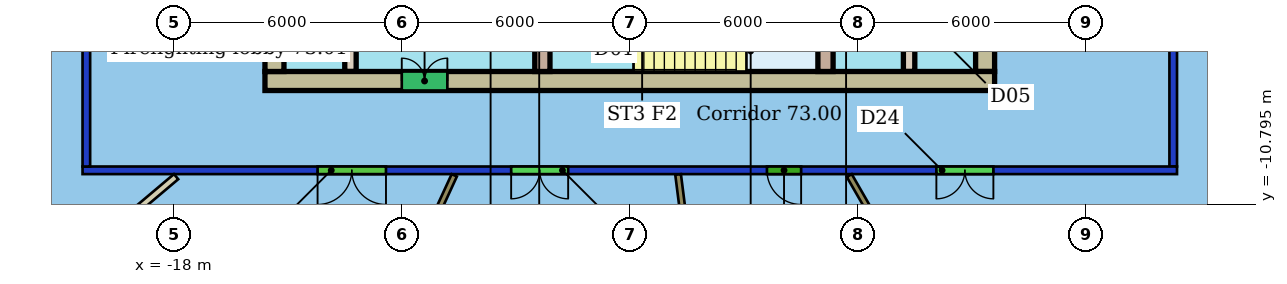
"""IFC4 building model, lengths in metres.
Left out: names, types, materials, properties, quantities, classifications, styles, units other than length and angle.
Written with IfcOpenShell. Run it as: python <this file> out.ifc"""

import sys

from ifc_helpers import new_model, si_unit, direction, frame, frame_2d, origin, place, context, subcontext, project, spatial, rectangle, extrude, element, fill, save


model = new_model("IFC4")
c1 = context("Model", 3, precision=1e-05, world=origin(), true_north=direction((0.0, 1.0)))
c2 = subcontext(c1, "Body", "Model", "MODEL_VIEW")
j1 = project(units=[si_unit("LENGTHUNIT", "METRE"), si_unit("PLANEANGLEUNIT", "RADIAN")], contexts=[c1])
p1 = place(None, origin())
s1 = spatial("IfcSite", under=j1, at=p1, CompositionType="ELEMENT")
p2 = place(p1, origin())
s2 = spatial("IfcBuilding", under=s1, at=p2, CompositionType="ELEMENT")
p3 = place(p2, frame((0.0, 0.0, 293.7)))
s3 = spatial("IfcBuildingStorey", under=s2, at=p3, CompositionType="ELEMENT", Elevation=293.7)
p4 = place(p3, frame((8.4, -9.9, 0.0), z_axis=(0.0, 0.0, 1.0), x_axis=(-1.0, 0.0, 0.0)))
e1 = element("IfcWall", 1, at=p4, inside=s3, PredefinedType="PARTITIONING", context=c2, shape_type="SweptSolid", body=[
    extrude(rectangle(XDim=28.8, YDim=0.2, at=frame_2d((14.4, 0.0))), origin(), (0.0, 0.0, 1.0), 3.1),
])
p5 = place(p4, frame((20.815, 0.0, 0.0)))
e2 = element("IfcOpeningElement", 2, at=p5, cuts=e1, PredefinedType="OPENING", context=c2, shape_type="SweptSolid", body=[
    extrude(rectangle(XDim=1.8, YDim=2.4, at=frame_2d((0.9, 1.2))), frame((0.0, 0.11, 0.0), z_axis=(0.0, -1.0, 0.0), x_axis=(1.0, 0.0, 0.0)), (0.0, 0.0, 1.0), 0.22),
])
p6 = place(p4, frame((16.021, 0.0, 0.0)))
e3 = element("IfcOpeningElement", 3, at=p6, cuts=e1, PredefinedType="OPENING", context=c2, shape_type="SweptSolid", body=[
    extrude(rectangle(XDim=1.5, YDim=2.1, at=frame_2d((0.75, 1.05))), frame((0.0, 0.11, 0.0), z_axis=(0.0, -1.0, 0.0), x_axis=(1.0, 0.0, 0.0)), (0.0, 0.0, 1.0), 0.22),
])
p7 = place(p4, frame((9.891, 0.0, 0.0)))
e4 = element("IfcOpeningElement", 4, at=p7, cuts=e1, PredefinedType="OPENING", context=c2, shape_type="SweptSolid", body=[
    extrude(rectangle(XDim=0.9, YDim=2.1, at=frame_2d((0.45, 1.05))), frame((0.0, 0.11, 0.0), z_axis=(0.0, -1.0, 0.0), x_axis=(1.0, 0.0, 0.0)), (0.0, 0.0, 1.0), 0.22),
])
p8 = place(p4, frame((4.832, 0.0, 0.0)))
e5 = element("IfcOpeningElement", 5, at=p8, cuts=e1, PredefinedType="OPENING", context=c2, shape_type="SweptSolid", body=[
    extrude(rectangle(XDim=1.5, YDim=2.1, at=frame_2d((0.75, 1.05))), frame((0.0, 0.11, 0.0), z_axis=(0.0, -1.0, 0.0), x_axis=(1.0, 0.0, 0.0)), (0.0, 0.0, 1.0), 0.22),
])
p9 = place(p3, frame((-20.3, -9.8, 0.0), z_axis=(0.0, 0.0, 1.0), x_axis=(0.0, 1.0, 0.0)))
e6 = element("IfcWall", 6, at=p9, inside=s3, PredefinedType="PARTITIONING", context=c2, shape_type="SweptSolid", body=[
    extrude(rectangle(XDim=19.6, YDim=0.2, at=frame_2d((9.8, 0.0))), origin(), (0.0, 0.0, 1.0), 3.1),
])
p10 = place(p9, frame((8.147, 0.0, 0.0)))
e7 = element("IfcOpeningElement", 7, at=p10, cuts=e6, PredefinedType="OPENING", context=c2, shape_type="SweptSolid", body=[
    extrude(rectangle(XDim=1.5, YDim=2.1, at=frame_2d((0.75, 1.05))), frame((0.0, 0.11, 0.0), z_axis=(0.0, -1.0, 0.0), x_axis=(1.0, 0.0, 0.0)), (0.0, 0.0, 1.0), 0.22),
])
p11 = place(p9, frame((4.031, 0.0, 0.0)))
e8 = element("IfcOpeningElement", 8, at=p11, cuts=e6, PredefinedType="OPENING", context=c2, shape_type="SweptSolid", body=[
    extrude(rectangle(XDim=1.0, YDim=2.1, at=frame_2d((0.5, 1.05))), frame((0.0, 0.11, 0.0), z_axis=(0.0, -1.0, 0.0), x_axis=(1.0, 0.0, 0.0)), (0.0, 0.0, 1.0), 0.22),
])
p12 = place(p3, frame((8.3, 9.8, 0.0), z_axis=(0.0, 0.0, 1.0), x_axis=(0.0, -1.0, 0.0)))
e9 = element("IfcWall", 9, at=p12, inside=s3, PredefinedType="PARTITIONING", context=c2, shape_type="SweptSolid", body=[
    extrude(rectangle(XDim=19.6, YDim=0.2, at=frame_2d((9.8, 0.0))), origin(), (0.0, 0.0, 1.0), 3.1),
])
p13 = place(p12, frame((8.302, 0.0, 0.0)))
e10 = element("IfcOpeningElement", 10, at=p13, cuts=e9, PredefinedType="OPENING", context=c2, shape_type="SweptSolid", body=[
    extrude(rectangle(XDim=0.9, YDim=2.1, at=frame_2d((0.45, 1.05))), frame((0.0, 0.11, 0.0), z_axis=(0.0, -1.0, 0.0), x_axis=(1.0, 0.0, 0.0)), (0.0, 0.0, 1.0), 0.22),
])
p14 = place(p12, frame((3.681, 0.0, 0.0)))
e11 = element("IfcOpeningElement", 11, at=p14, cuts=e9, PredefinedType="OPENING", context=c2, shape_type="SweptSolid", body=[
    extrude(rectangle(XDim=1.5, YDim=2.4, at=frame_2d((0.75, 1.2))), frame((0.0, 0.11, 0.0), z_axis=(0.0, -1.0, 0.0), x_axis=(1.0, 0.0, 0.0)), (0.0, 0.0, 1.0), 0.22),
])
p15 = place(p3, frame((-23.902, -15.095, 0.0), z_axis=(0.0, 0.0, 1.0), x_axis=(0.764496313842, 0.644628099079, 0.0)))
e12 = element("IfcWall", 12, at=p15, inside=s3, PredefinedType="PARTITIONING", context=c2, shape_type="SweptSolid", body=[
    extrude(rectangle(XDim=7.801, YDim=0.175, at=frame_2d((3.9, 0.0))), origin(), (0.0, 0.0, 1.0), 3.45),
])
p16 = place(p3, frame((-16.226, -22.213, 0.0), z_axis=(0.0, 0.0, 1.0), x_axis=(0.418174840515, 0.908366557487, 0.0)))
e13 = element("IfcWall", 13, at=p16, inside=s3, PredefinedType="PARTITIONING", context=c2, shape_type="SweptSolid", body=[
    extrude(rectangle(XDim=13.411, YDim=0.15, at=frame_2d((6.706, 0.0))), origin(), (0.0, 0.0, 1.0), 3.45),
])
p17 = place(p3, frame((-3.115, -22.716, 0.0), z_axis=(0.0, 0.0, 1.0), x_axis=(-0.125990997463, 0.992031384866, 0.0)))
e14 = element("IfcWall", 14, at=p17, inside=s3, PredefinedType="PARTITIONING", context=c2, shape_type="SweptSolid", body=[
    extrude(rectangle(XDim=12.809, YDim=0.15, at=frame_2d((6.404, 0.0))), origin(), (0.0, 0.0, 1.0), 3.45),
])
p18 = place(p3, frame((4.563, -18.357, 0.0), z_axis=(0.0, 0.0, 1.0), x_axis=(-0.498722463037, 0.86676173477, 0.0)))
e15 = element("IfcWall", 15, at=p18, inside=s3, PredefinedType="PARTITIONING", context=c2, shape_type="SweptSolid", body=[
    extrude(rectangle(XDim=9.599, YDim=0.15, at=frame_2d((4.799, 0.0))), origin(), (0.0, 0.0, 1.0), 3.45),
])
p19 = place(p3, frame((-15.6, -7.55, 0.0), z_axis=(0.0, 0.0, 1.0), x_axis=(1.0, 0.0, 0.0)))
e16 = element("IfcWall", 16, at=p19, inside=s3, PredefinedType="SHEAR", context=c2, shape_type="SweptSolid", body=[
    extrude(rectangle(XDim=19.2, YDim=0.5, at=frame_2d((9.6, 0.0))), origin(), (0.0, 0.0, 1.0), 3.3),
])
p20 = place(p19, frame((3.6, 0.0, 0.0)))
e17 = element("IfcOpeningElement", 17, at=p20, cuts=e16, PredefinedType="OPENING", context=c2, shape_type="SweptSolid", body=[
    extrude(rectangle(XDim=1.2, YDim=2.1, at=frame_2d((0.6, 1.05))), frame((0.0, 0.26, 0.0), z_axis=(0.0, -1.0, 0.0), x_axis=(1.0, 0.0, 0.0)), (0.0, 0.0, 1.0), 0.52),
])
p21 = place(p3, frame((-15.35, 7.3, 0.0), z_axis=(0.0, 0.0, 1.0), x_axis=(0.0, -1.0, 0.0)))
e18 = element("IfcWall", 18, at=p21, inside=s3, PredefinedType="SHEAR", context=c2, shape_type="SweptSolid", body=[
    extrude(rectangle(XDim=14.6, YDim=0.5, at=frame_2d((7.3, 0.0))), origin(), (0.0, 0.0, 1.0), 3.3),
])
p22 = place(p21, frame((10.6, 0.0, 0.0)))
e19 = element("IfcOpeningElement", 19, at=p22, cuts=e18, PredefinedType="OPENING", context=c2, shape_type="SweptSolid", body=[
    extrude(rectangle(XDim=1.2, YDim=2.1, at=frame_2d((0.6, 1.05))), frame((0.0, 0.26, 0.0), z_axis=(0.0, -1.0, 0.0), x_axis=(1.0, 0.0, 0.0)), (0.0, 0.0, 1.0), 0.52),
])
p23 = place(p21, frame((2.8, 0.0, 0.0)))
e20 = element("IfcOpeningElement", 20, at=p23, cuts=e18, PredefinedType="OPENING", context=c2, shape_type="SweptSolid", body=[
    extrude(rectangle(XDim=1.2, YDim=2.1, at=frame_2d((0.6, 1.05))), frame((0.0, 0.26, 0.0), z_axis=(0.0, -1.0, 0.0), x_axis=(1.0, 0.0, 0.0)), (0.0, 0.0, 1.0), 0.52),
])
p24 = place(p3, frame((3.35, -7.3, 0.0), z_axis=(0.0, 0.0, 1.0), x_axis=(0.0, 1.0, 0.0)))
e21 = element("IfcWall", 21, at=p24, inside=s3, PredefinedType="SHEAR", context=c2, shape_type="SweptSolid", body=[
    extrude(rectangle(XDim=14.6, YDim=0.5, at=frame_2d((7.3, 0.0))), origin(), (0.0, 0.0, 1.0), 3.3),
])
p25 = place(p24, frame((2.8, 0.0, 0.0)))
e22 = element("IfcOpeningElement", 22, at=p25, cuts=e21, PredefinedType="OPENING", context=c2, shape_type="SweptSolid", body=[
    extrude(rectangle(XDim=1.2, YDim=2.1, at=frame_2d((0.6, 1.05))), frame((0.0, 0.26, 0.0), z_axis=(0.0, -1.0, 0.0), x_axis=(1.0, 0.0, 0.0)), (0.0, 0.0, 1.0), 0.52),
])
p26 = place(p24, frame((10.6, 0.0, 0.0)))
e23 = element("IfcOpeningElement", 23, at=p26, cuts=e21, PredefinedType="OPENING", context=c2, shape_type="SweptSolid", body=[
    extrude(rectangle(XDim=1.2, YDim=2.1, at=frame_2d((0.6, 1.05))), frame((0.0, 0.26, 0.0), z_axis=(0.0, -1.0, 0.0), x_axis=(1.0, 0.0, 0.0)), (0.0, 0.0, 1.0), 0.52),
])
p27 = place(p3, frame((-13.35, 7.3, 0.0), z_axis=(0.0, 0.0, 1.0), x_axis=(0.0, -1.0, 0.0)))
e24 = element("IfcWall", 24, at=p27, inside=s3, PredefinedType="SHEAR", context=c2, shape_type="SweptSolid", body=[
    extrude(rectangle(XDim=14.6, YDim=0.3, at=frame_2d((7.3, 0.0))), origin(), (0.0, 0.0, 1.0), 3.3),
])
p28 = place(p27, frame((6.55, 0.0, 0.0)))
e25 = element("IfcOpeningElement", 25, at=p28, cuts=e24, PredefinedType="OPENING", context=c2, shape_type="SweptSolid", body=[
    extrude(rectangle(XDim=1.5, YDim=2.1, at=frame_2d((0.75, 1.05))), frame((0.0, 0.16, 0.0), z_axis=(0.0, -1.0, 0.0), x_axis=(1.0, 0.0, 0.0)), (0.0, 0.0, 1.0), 0.32),
])
p29 = place(p3, frame((1.35, -7.3, 0.0), z_axis=(0.0, 0.0, 1.0), x_axis=(0.0, 1.0, 0.0)))
e26 = element("IfcWall", 26, at=p29, inside=s3, PredefinedType="SHEAR", context=c2, shape_type="SweptSolid", body=[
    extrude(rectangle(XDim=14.6, YDim=0.3, at=frame_2d((7.3, 0.0))), origin(), (0.0, 0.0, 1.0), 3.3),
])
p30 = place(p29, frame((1.21, 0.0, 0.0)))
e27 = element("IfcOpeningElement", 27, at=p30, cuts=e26, PredefinedType="OPENING", context=c2, shape_type="SweptSolid", body=[
    extrude(rectangle(XDim=1.0, YDim=2.1, at=frame_2d((0.5, 1.05))), frame((0.0, 0.16, 0.0), z_axis=(0.0, -1.0, 0.0), x_axis=(1.0, 0.0, 0.0)), (0.0, 0.0, 1.0), 0.32),
])
p31 = place(p29, frame((6.55, 0.0, 0.0)))
e28 = element("IfcOpeningElement", 28, at=p31, cuts=e26, PredefinedType="OPENING", context=c2, shape_type="SweptSolid", body=[
    extrude(rectangle(XDim=1.5, YDim=2.1, at=frame_2d((0.75, 1.05))), frame((0.0, 0.16, 0.0), z_axis=(0.0, -1.0, 0.0), x_axis=(1.0, 0.0, 0.0)), (0.0, 0.0, 1.0), 0.32),
])
p32 = place(p3, frame((-8.3, -3.88, 0.0), z_axis=(0.0, 0.0, 1.0), x_axis=(0.0, -1.0, 0.0)))
e29 = element("IfcWall", 29, at=p32, inside=s3, PredefinedType="SHEAR", context=c2, shape_type="SweptSolid", body=[
    extrude(rectangle(XDim=3.42, YDim=0.4, at=frame_2d((1.71, 0.0))), origin(), (0.0, 0.0, 1.0), 3.3),
])
p33 = place(p32, frame((1.11, 0.0, 0.0)))
e30 = element("IfcOpeningElement", 30, at=p33, cuts=e29, PredefinedType="OPENING", context=c2, shape_type="SweptSolid", body=[
    extrude(rectangle(XDim=1.2, YDim=2.1, at=frame_2d((0.6, 1.05))), frame((0.0, 0.21, 0.0), z_axis=(0.0, -1.0, 0.0), x_axis=(1.0, 0.0, 0.0)), (0.0, 0.0, 1.0), 0.42),
])
p34 = place(p3, frame((-0.85, -3.88, 0.0), z_axis=(0.0, 0.0, 1.0), x_axis=(0.0, -1.0, 0.0)))
e31 = element("IfcWall", 31, at=p34, inside=s3, PredefinedType="SHEAR", context=c2, shape_type="SweptSolid", body=[
    extrude(rectangle(XDim=3.42, YDim=0.4, at=frame_2d((1.71, 0.0))), origin(), (0.0, 0.0, 1.0), 3.3),
])
p35 = place(p5, origin())
e32 = element("IfcDoor", 32, at=p35, inside=s3, OperationType="DOUBLE_DOOR_SINGLE_SWING", PredefinedType="DOOR", context=c2, shape_type="SweptSolid", body=[
    extrude(rectangle(XDim=1.8, YDim=2.4, at=frame_2d((0.9, 1.2))), frame((0.0, 0.025, 0.0), z_axis=(0.0, -1.0, 0.0), x_axis=(1.0, 0.0, 0.0)), (0.0, 0.0, 1.0), 0.05),
])
fill(e2, e32)
p36 = place(p6, origin())
e33 = element("IfcDoor", 33, at=p36, inside=s3, OperationType="DOUBLE_DOOR_SINGLE_SWING", PredefinedType="DOOR", context=c2, shape_type="SweptSolid", body=[
    extrude(rectangle(XDim=1.5, YDim=2.1, at=frame_2d((0.75, 1.05))), frame((0.0, 0.025, 0.0), z_axis=(0.0, -1.0, 0.0), x_axis=(1.0, 0.0, 0.0)), (0.0, 0.0, 1.0), 0.05),
])
fill(e3, e33)
p37 = place(p7, origin())
e34 = element("IfcDoor", 34, at=p37, inside=s3, OperationType="SINGLE_SWING_LEFT", PredefinedType="DOOR", context=c2, shape_type="SweptSolid", body=[
    extrude(rectangle(XDim=0.9, YDim=2.1, at=frame_2d((0.45, 1.05))), frame((0.0, 0.025, 0.0), z_axis=(0.0, -1.0, 0.0), x_axis=(1.0, 0.0, 0.0)), (0.0, 0.0, 1.0), 0.05),
])
fill(e4, e34)
p38 = place(p8, origin())
e35 = element("IfcDoor", 35, at=p38, inside=s3, OperationType="DOUBLE_DOOR_SINGLE_SWING", PredefinedType="DOOR", context=c2, shape_type="SweptSolid", body=[
    extrude(rectangle(XDim=1.5, YDim=2.1, at=frame_2d((0.75, 1.05))), frame((0.0, 0.025, 0.0), z_axis=(0.0, -1.0, 0.0), x_axis=(1.0, 0.0, 0.0)), (0.0, 0.0, 1.0), 0.05),
])
fill(e5, e35)
p39 = place(p20, origin())
e36 = element("IfcDoor", 36, at=p39, inside=s3, OperationType="DOUBLE_DOOR_SINGLE_SWING", PredefinedType="NOTDEFINED", context=c2, shape_type="SweptSolid", body=[
    extrude(rectangle(XDim=1.2, YDim=2.1, at=frame_2d((0.6, 1.05))), frame((0.0, 0.025, 0.0), z_axis=(0.0, -1.0, 0.0), x_axis=(1.0, 0.0, 0.0)), (0.0, 0.0, 1.0), 0.05),
])
fill(e17, e36)
save(model, sys.argv[1])
